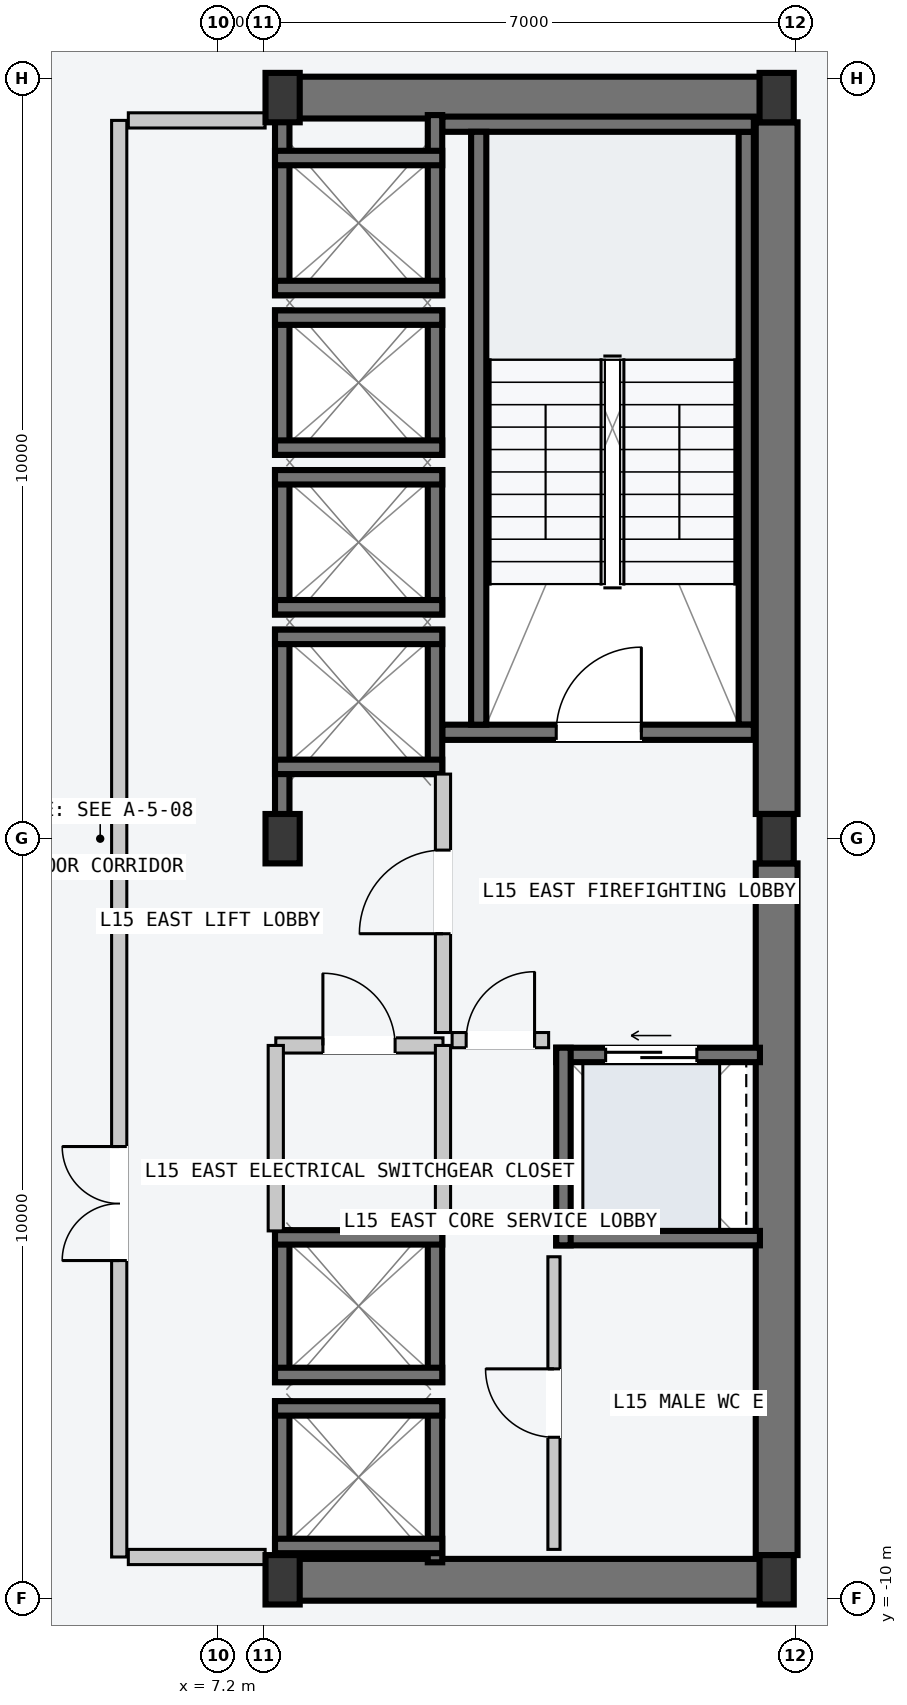
"""IFC4 building model, lengths in metres.
Left out: names, types, materials, properties, quantities, classifications, styles, units other than length and angle.
Written with IfcOpenShell. Run it as: python <this file> out.ifc"""

import sys

from ifc_helpers import new_model, si_unit, direction, frame, frame_2d, origin, origin_2d, place, context, subcontext, project, spatial, rectangle, i_section, extrude, element, fill, save


model = new_model("IFC4")
c1 = context("Model", 3, precision=1e-05, world=origin(), true_north=direction((0.0, 1.0)))
c2 = subcontext(c1, "Body", "Model", "MODEL_VIEW")
j1 = project(units=[si_unit("LENGTHUNIT", "METRE"), si_unit("PLANEANGLEUNIT", "RADIAN")], contexts=[c1])
p1 = place(None, origin())
s1 = spatial("IfcSite", under=j1, at=p1, CompositionType="ELEMENT")
p2 = place(p1, origin())
s2 = spatial("IfcBuilding", under=s1, at=p2, CompositionType="ELEMENT")
p3 = place(p2, frame((0.0, 0.0, 60.0)))
s3 = spatial("IfcBuildingStorey", under=s2, at=p3, CompositionType="ELEMENT", Elevation=60.0)
for number, where, z_axis, x_axis in (
    (1, (8.07, -9.75, -0.2), (0.0, 0.0, 1.0), (1.0, 0.0, 0.0)),
    (2, (8.07, 9.75, -0.2), (0.0, 0.0, 1.0), (1.0, 0.0, 0.0)),
):
    element("IfcWall", number, at=place(p3, frame(where, z_axis=z_axis, x_axis=x_axis)), inside=s3, PredefinedType="SHEAR", context=c2, shape_type="SweptSolid", body=[
        extrude(rectangle(XDim=6.46, YDim=0.55, at=frame_2d((3.23, 0.0))), origin(), (0.0, 0.0, 1.0), 3.6),
    ])
for number, where, z_axis, x_axis in (
    (3, (14.55, -9.425, -0.2), (0.0, 0.0, 1.0), (0.0, 1.0, 0.0)),
    (4, (14.55, 0.325, -0.2), (0.0, 0.0, 1.0), (0.0, 1.0, 0.0)),
):
    element("IfcWall", number, at=place(p3, frame(where, z_axis=z_axis, x_axis=x_axis)), inside=s3, PredefinedType="SHEAR", context=c2, shape_type="SweptSolid", body=[
        extrude(rectangle(XDim=9.1, YDim=0.55, at=frame_2d((4.55, 0.0))), origin(), (0.0, 0.0, 1.0), 3.6),
    ])
p4 = place(p3, frame((14.15, 1.5, -0.2), z_axis=(0.0, 0.0, 1.0), x_axis=(0.0, 1.0, 0.0)))
e5 = element("IfcWall", 5, at=p4, inside=s3, PredefinedType="SOLIDWALL", context=c2, shape_type="SweptSolid", body=[
    extrude(rectangle(XDim=7.8, YDim=0.2, at=frame_2d((3.9, 0.0))), origin(), (0.0, 0.0, 1.0), 3.6),
])
p5 = place(p3, frame((10.15, 1.4, -0.2), z_axis=(0.0, 0.0, 1.0), x_axis=(1.0, 0.0, 0.0)))
e6 = element("IfcWall", 6, at=p5, inside=s3, PredefinedType="SOLIDWALL", context=c2, shape_type="SweptSolid", body=[
    extrude(rectangle(XDim=4.1, YDim=0.2, at=frame_2d((2.05, 0.0))), origin(), (0.0, 0.0, 1.0), 3.6),
])
p6 = place(p5, frame((1.5, 0.0, 0.2)))
e7 = element("IfcOpeningElement", 7, at=p6, cuts=e6, PredefinedType="OPENING", context=c2, shape_type="SweptSolid", body=[
    extrude(rectangle(XDim=1.12, YDim=2.18, at=frame_2d((0.56, 1.09))), frame((0.0, 0.11, 0.0), z_axis=(0.0, -1.0, 0.0), x_axis=(1.0, 0.0, 0.0)), (0.0, 0.0, 1.0), 0.22),
])
p7 = place(p3, frame((10.15, 9.4, -0.2), z_axis=(0.0, 0.0, 1.0), x_axis=(1.0, 0.0, 0.0)))
e8 = element("IfcWall", 8, at=p7, inside=s3, PredefinedType="SOLIDWALL", context=c2, shape_type="SweptSolid", body=[
    extrude(rectangle(XDim=4.1, YDim=0.2, at=frame_2d((2.05, 0.0))), origin(), (0.0, 0.0, 1.0), 3.6),
])
p8 = place(p3, frame((10.63, 1.5, -0.2), z_axis=(0.0, 0.0, 1.0), x_axis=(0.0, 1.0, 0.0)))
e9 = element("IfcWall", 9, at=p8, inside=s3, PredefinedType="SOLIDWALL", context=c2, shape_type="SweptSolid", body=[
    extrude(rectangle(XDim=7.8, YDim=0.2, at=frame_2d((3.9, 0.0))), origin(), (0.0, 0.0, 1.0), 3.6),
])
for number, where, z_axis, x_axis in (
    (10, (8.05, -9.75, 0.0), (0.0, 0.0, 1.0), (1.0, 0.0, 0.0)),
    (11, (8.05, 0.0, 0.0), (0.0, 0.0, 1.0), (1.0, 0.0, 0.0)),
    (12, (8.05, 9.75, 0.0), (0.0, 0.0, 1.0), (1.0, 0.0, 0.0)),
    (13, (14.55, -9.75, 0.0), (0.0, 0.0, 1.0), (1.0, 0.0, 0.0)),
    (14, (14.55, 0.0, 0.0), (0.0, 0.0, 1.0), (1.0, 0.0, 0.0)),
    (15, (14.55, 9.75, 0.0), (0.0, 0.0, 1.0), (1.0, 0.0, 0.0)),
):
    element("IfcColumn", number, at=place(p3, frame(where, z_axis=z_axis, x_axis=x_axis)), inside=s3, PredefinedType="COLUMN", context=c2, shape_type="SweptSolid", body=[
        extrude(i_section(OverallWidth=0.45, OverallDepth=0.65, WebThickness=0.025, FlangeThickness=0.04, at=origin_2d()), origin(), (0.0, 0.0, 1.0), 3.6),
    ])
p9 = place(p3, frame((8.045, 0.21, -0.2), z_axis=(0.0, 0.0, 1.0), x_axis=(0.0, 1.0, 0.0)))
e16 = element("IfcWall", 16, at=p9, inside=s3, PredefinedType="SOLIDWALL", context=c2, shape_type="SweptSolid", body=[
    extrude(rectangle(XDim=2.54, YDim=0.19, at=frame_2d((1.27, 0.0))), origin(), (0.0, 0.0, 1.0), 3.6),
])
p10 = place(p3, frame((10.055, 0.85, -0.2), z_axis=(0.0, 0.0, 1.0), x_axis=(0.0, 1.0, 0.0)))
e17 = element("IfcWall", 17, at=p10, inside=s3, PredefinedType="SOLIDWALL", context=c2, shape_type="SweptSolid", body=[
    extrude(rectangle(XDim=1.9, YDim=0.19, at=frame_2d((0.95, 0.0))), origin(), (0.0, 0.0, 1.0), 3.6),
])
for number, where, z_axis, x_axis in (
    (18, (7.95, 2.655, -0.2), (0.0, 0.0, 1.0), (1.0, 0.0, 0.0)),
    (19, (7.95, 0.945, -0.2), (0.0, 0.0, 1.0), (1.0, 0.0, 0.0)),
):
    element("IfcWall", number, at=place(p3, frame(where, z_axis=z_axis, x_axis=x_axis)), inside=s3, PredefinedType="SOLIDWALL", context=c2, shape_type="SweptSolid", body=[
        extrude(rectangle(XDim=2.2, YDim=0.19, at=frame_2d((1.1, 0.0))), origin(), (0.0, 0.0, 1.0), 3.6),
    ])
for number, where, z_axis, x_axis in (
    (20, (8.045, 2.95, -0.2), (0.0, 0.0, 1.0), (0.0, 1.0, 0.0)),
    (21, (10.055, 2.95, -0.2), (0.0, 0.0, 1.0), (0.0, 1.0, 0.0)),
):
    element("IfcWall", number, at=place(p3, frame(where, z_axis=z_axis, x_axis=x_axis)), inside=s3, PredefinedType="SOLIDWALL", context=c2, shape_type="SweptSolid", body=[
        extrude(rectangle(XDim=1.9, YDim=0.19, at=frame_2d((0.95, 0.0))), origin(), (0.0, 0.0, 1.0), 3.6),
    ])
for number, where, z_axis, x_axis in (
    (22, (7.95, 4.755, -0.2), (0.0, 0.0, 1.0), (1.0, 0.0, 0.0)),
    (23, (7.95, 3.045, -0.2), (0.0, 0.0, 1.0), (1.0, 0.0, 0.0)),
):
    element("IfcWall", number, at=place(p3, frame(where, z_axis=z_axis, x_axis=x_axis)), inside=s3, PredefinedType="SOLIDWALL", context=c2, shape_type="SweptSolid", body=[
        extrude(rectangle(XDim=2.2, YDim=0.19, at=frame_2d((1.1, 0.0))), origin(), (0.0, 0.0, 1.0), 3.6),
    ])
for number, where, z_axis, x_axis in (
    (24, (8.045, 5.05, -0.2), (0.0, 0.0, 1.0), (0.0, 1.0, 0.0)),
    (25, (10.055, 5.05, -0.2), (0.0, 0.0, 1.0), (0.0, 1.0, 0.0)),
):
    element("IfcWall", number, at=place(p3, frame(where, z_axis=z_axis, x_axis=x_axis)), inside=s3, PredefinedType="SOLIDWALL", context=c2, shape_type="SweptSolid", body=[
        extrude(rectangle(XDim=1.9, YDim=0.19, at=frame_2d((0.95, 0.0))), origin(), (0.0, 0.0, 1.0), 3.6),
    ])
for number, where, z_axis, x_axis in (
    (26, (7.95, 6.855, -0.2), (0.0, 0.0, 1.0), (1.0, 0.0, 0.0)),
    (27, (7.95, 5.145, -0.2), (0.0, 0.0, 1.0), (1.0, 0.0, 0.0)),
):
    element("IfcWall", number, at=place(p3, frame(where, z_axis=z_axis, x_axis=x_axis)), inside=s3, PredefinedType="SOLIDWALL", context=c2, shape_type="SweptSolid", body=[
        extrude(rectangle(XDim=2.2, YDim=0.19, at=frame_2d((1.1, 0.0))), origin(), (0.0, 0.0, 1.0), 3.6),
    ])
for number, where, z_axis, x_axis in (
    (28, (8.045, 7.15, -0.2), (0.0, 0.0, 1.0), (0.0, 1.0, 0.0)),
    (29, (10.055, 7.15, -0.2), (0.0, 0.0, 1.0), (0.0, 1.0, 0.0)),
):
    element("IfcWall", number, at=place(p3, frame(where, z_axis=z_axis, x_axis=x_axis)), inside=s3, PredefinedType="SOLIDWALL", context=c2, shape_type="SweptSolid", body=[
        extrude(rectangle(XDim=2.37, YDim=0.19, at=frame_2d((1.185, 0.0))), origin(), (0.0, 0.0, 1.0), 3.6),
    ])
for number, where, z_axis, x_axis in (
    (30, (7.95, 8.955, -0.2), (0.0, 0.0, 1.0), (1.0, 0.0, 0.0)),
    (31, (7.95, 7.245, -0.2), (0.0, 0.0, 1.0), (1.0, 0.0, 0.0)),
):
    element("IfcWall", number, at=place(p3, frame(where, z_axis=z_axis, x_axis=x_axis)), inside=s3, PredefinedType="SOLIDWALL", context=c2, shape_type="SweptSolid", body=[
        extrude(rectangle(XDim=2.2, YDim=0.19, at=frame_2d((1.1, 0.0))), origin(), (0.0, 0.0, 1.0), 3.6),
    ])
for number, where, z_axis, x_axis in (
    (32, (8.045, -9.52, -0.2), (0.0, 0.0, 1.0), (0.0, 1.0, 0.0)),
    (33, (10.055, -9.52, -0.2), (0.0, 0.0, 1.0), (0.0, 1.0, 0.0)),
):
    element("IfcWall", number, at=place(p3, frame(where, z_axis=z_axis, x_axis=x_axis)), inside=s3, PredefinedType="SOLIDWALL", context=c2, shape_type="SweptSolid", body=[
        extrude(rectangle(XDim=2.12, YDim=0.19, at=frame_2d((1.06, 0.0))), origin(), (0.0, 0.0, 1.0), 3.6),
    ])
for number, where, z_axis, x_axis in (
    (34, (7.95, -7.495, -0.2), (0.0, 0.0, 1.0), (1.0, 0.0, 0.0)),
    (35, (7.95, -9.305, -0.2), (0.0, 0.0, 1.0), (1.0, 0.0, 0.0)),
):
    element("IfcWall", number, at=place(p3, frame(where, z_axis=z_axis, x_axis=x_axis)), inside=s3, PredefinedType="SOLIDWALL", context=c2, shape_type="SweptSolid", body=[
        extrude(rectangle(XDim=2.2, YDim=0.19, at=frame_2d((1.1, 0.0))), origin(), (0.0, 0.0, 1.0), 3.6),
    ])
for number, where, z_axis, x_axis in (
    (36, (8.045, -7.15, -0.2), (0.0, 0.0, 1.0), (0.0, 1.0, 0.0)),
    (37, (10.055, -7.15, -0.2), (0.0, 0.0, 1.0), (0.0, 1.0, 0.0)),
):
    element("IfcWall", number, at=place(p3, frame(where, z_axis=z_axis, x_axis=x_axis)), inside=s3, PredefinedType="SOLIDWALL", context=c2, shape_type="SweptSolid", body=[
        extrude(rectangle(XDim=2.0, YDim=0.19, at=frame_2d((1.0, 0.0))), origin(), (0.0, 0.0, 1.0), 3.6),
    ])
for number, where, z_axis, x_axis in (
    (38, (7.95, -5.245, -0.2), (0.0, 0.0, 1.0), (1.0, 0.0, 0.0)),
    (39, (7.95, -7.055, -0.2), (0.0, 0.0, 1.0), (1.0, 0.0, 0.0)),
):
    element("IfcWall", number, at=place(p3, frame(where, z_axis=z_axis, x_axis=x_axis)), inside=s3, PredefinedType="SOLIDWALL", context=c2, shape_type="SweptSolid", body=[
        extrude(rectangle(XDim=2.2, YDim=0.19, at=frame_2d((1.1, 0.0))), origin(), (0.0, 0.0, 1.0), 3.6),
    ])
p11 = place(p3, frame((11.65, -2.845, -0.2), z_axis=(0.0, 0.0, 1.0), x_axis=(1.0, 0.0, 0.0)))
e40 = element("IfcWall", 40, at=p11, inside=s3, PredefinedType="SOLIDWALL", context=c2, shape_type="SweptSolid", body=[
    extrude(rectangle(XDim=2.68, YDim=0.19, at=frame_2d((1.34, 0.0))), origin(), (0.0, 0.0, 1.0), 3.6),
])
p12 = place(p11, frame((0.65, 0.0, 0.2)))
e41 = element("IfcOpeningElement", 41, at=p12, cuts=e40, PredefinedType="OPENING", context=c2, shape_type="SweptSolid", body=[
    extrude(rectangle(XDim=1.2, YDim=2.2, at=frame_2d((0.6, 1.1))), frame((0.0, 0.105, 0.0), z_axis=(0.0, -1.0, 0.0), x_axis=(1.0, 0.0, 0.0)), (0.0, 0.0, 1.0), 0.21),
])
p13 = place(p3, frame((11.65, -5.255, -0.2), z_axis=(0.0, 0.0, 1.0), x_axis=(1.0, 0.0, 0.0)))
e42 = element("IfcWall", 42, at=p13, inside=s3, PredefinedType="SOLIDWALL", context=c2, shape_type="SweptSolid", body=[
    extrude(rectangle(XDim=2.68, YDim=0.19, at=frame_2d((1.34, 0.0))), origin(), (0.0, 0.0, 1.0), 3.6),
])
p14 = place(p3, frame((11.745, -5.35, -0.2), z_axis=(0.0, 0.0, 1.0), x_axis=(0.0, 1.0, 0.0)))
e43 = element("IfcWall", 43, at=p14, inside=s3, PredefinedType="SOLIDWALL", context=c2, shape_type="SweptSolid", body=[
    extrude(rectangle(XDim=2.6, YDim=0.19, at=frame_2d((1.3, 0.0))), origin(), (0.0, 0.0, 1.0), 3.6),
])
p15 = place(p3, frame((5.9, -9.45, 0.0), z_axis=(0.0, 0.0, 1.0), x_axis=(0.0, 1.0, 0.0)))
e44 = element("IfcWall", 44, at=p15, inside=s3, PredefinedType="PARTITIONING", context=c2, shape_type="SweptSolid", body=[
    extrude(rectangle(XDim=18.9, YDim=0.2, at=frame_2d((9.45, 0.0))), origin(), (0.0, 0.0, 1.0), 3.4),
])
p16 = place(p15, frame((3.9, 0.0, 0.0)))
e45 = element("IfcOpeningElement", 45, at=p16, cuts=e44, PredefinedType="OPENING", context=c2, shape_type="SweptSolid", body=[
    extrude(rectangle(XDim=1.5, YDim=2.2, at=frame_2d((0.75, 1.1))), frame((0.0, 0.11, 0.0), z_axis=(0.0, -1.0, 0.0), x_axis=(1.0, 0.0, 0.0)), (0.0, 0.0, 1.0), 0.22),
])
for number, where, z_axis, x_axis in (
    (46, (6.02, -9.45, 0.0), (0.0, 0.0, 1.0), (1.0, 0.0, 0.0)),
    (47, (6.02, 9.45, 0.0), (0.0, 0.0, 1.0), (1.0, 0.0, 0.0)),
):
    element("IfcWall", number, at=place(p3, frame(where, z_axis=z_axis, x_axis=x_axis)), inside=s3, PredefinedType="PARTITIONING", context=c2, shape_type="SweptSolid", body=[
        extrude(rectangle(XDim=1.8, YDim=0.2, at=frame_2d((0.9, 0.0))), origin(), (0.0, 0.0, 1.0), 3.4),
    ])
p17 = place(p3, frame((10.16, -2.55, 0.0), z_axis=(0.0, 0.0, 1.0), x_axis=(0.0, 1.0, 0.0)))
e48 = element("IfcWall", 48, at=p17, inside=s3, PredefinedType="PARTITIONING", context=c2, shape_type="SweptSolid", body=[
    extrude(rectangle(XDim=3.4, YDim=0.2, at=frame_2d((1.7, 0.0))), origin(), (0.0, 0.0, 1.0), 3.4),
])
p18 = place(p17, frame((1.3, 0.0, 0.0)))
e49 = element("IfcOpeningElement", 49, at=p18, cuts=e48, PredefinedType="OPENING", context=c2, shape_type="SweptSolid", body=[
    extrude(rectangle(XDim=1.1, YDim=2.15, at=frame_2d((0.55, 1.075))), frame((0.0, 0.11, 0.0), z_axis=(0.0, -1.0, 0.0), x_axis=(1.0, 0.0, 0.0)), (0.0, 0.0, 1.0), 0.22),
])
p19 = place(p3, frame((10.28, -2.65, 0.0), z_axis=(0.0, 0.0, 1.0), x_axis=(1.0, 0.0, 0.0)))
e50 = element("IfcWall", 50, at=p19, inside=s3, PredefinedType="PARTITIONING", context=c2, shape_type="SweptSolid", body=[
    extrude(rectangle(XDim=1.27, YDim=0.2, at=frame_2d((0.635, 0.0))), origin(), (0.0, 0.0, 1.0), 3.4),
])
p20 = place(p19, frame((0.185, 0.0, 0.0)))
e51 = element("IfcOpeningElement", 51, at=p20, cuts=e50, PredefinedType="OPENING", context=c2, shape_type="SweptSolid", body=[
    extrude(rectangle(XDim=0.9, YDim=2.15, at=frame_2d((0.45, 1.075))), frame((0.0, 0.11, 0.0), z_axis=(0.0, -1.0, 0.0), x_axis=(1.0, 0.0, 0.0)), (0.0, 0.0, 1.0), 0.22),
])
p21 = place(p3, frame((7.96, -2.72, 0.0), z_axis=(0.0, 0.0, 1.0), x_axis=(1.0, 0.0, 0.0)))
e52 = element("IfcWall", 52, at=p21, inside=s3, PredefinedType="PARTITIONING", context=c2, shape_type="SweptSolid", body=[
    extrude(rectangle(XDim=2.2, YDim=0.2, at=frame_2d((1.1, 0.0))), origin(), (0.0, 0.0, 1.0), 3.4),
])
p22 = place(p21, frame((0.62, 0.0, 0.0)))
e53 = element("IfcOpeningElement", 53, at=p22, cuts=e52, PredefinedType="OPENING", context=c2, shape_type="SweptSolid", body=[
    extrude(rectangle(XDim=0.95, YDim=2.1, at=frame_2d((0.475, 1.05))), frame((0.0, 0.11, 0.0), z_axis=(0.0, -1.0, 0.0), x_axis=(1.0, 0.0, 0.0)), (0.0, 0.0, 1.0), 0.22),
])
for number, where, z_axis, x_axis in (
    (54, (7.96, -5.16, 0.0), (0.0, 0.0, 1.0), (0.0, 1.0, 0.0)),
    (55, (10.16, -5.16, 0.0), (0.0, 0.0, 1.0), (0.0, 1.0, 0.0)),
):
    element("IfcWall", number, at=place(p3, frame(where, z_axis=z_axis, x_axis=x_axis)), inside=s3, PredefinedType="PARTITIONING", context=c2, shape_type="SweptSolid", body=[
        extrude(rectangle(XDim=2.44, YDim=0.2, at=frame_2d((1.22, 0.0))), origin(), (0.0, 0.0, 1.0), 3.4),
    ])
p23 = place(p3, frame((11.62, -9.35, 0.0), z_axis=(0.0, 0.0, 1.0), x_axis=(0.0, 1.0, 0.0)))
e56 = element("IfcWall", 56, at=p23, inside=s3, PredefinedType="PARTITIONING", context=c2, shape_type="SweptSolid", body=[
    extrude(rectangle(XDim=3.85, YDim=0.16, at=frame_2d((1.925, 0.0))), origin(), (0.0, 0.0, 1.0), 3.4),
])
p24 = place(p23, frame((1.475, 0.0, 0.0)))
e57 = element("IfcOpeningElement", 57, at=p24, cuts=e56, PredefinedType="OPENING", context=c2, shape_type="SweptSolid", body=[
    extrude(rectangle(XDim=0.9, YDim=2.15, at=frame_2d((0.45, 1.075))), frame((0.0, 0.09, 0.0), z_axis=(0.0, -1.0, 0.0), x_axis=(1.0, 0.0, 0.0)), (0.0, 0.0, 1.0), 0.18),
])
p25 = place(p6, origin())
e58 = element("IfcDoor", 58, at=p25, inside=s3, OperationType="SINGLE_SWING_RIGHT", PredefinedType="DOOR", context=c2, shape_type="SweptSolid", body=[
    extrude(rectangle(XDim=1.12, YDim=2.18, at=frame_2d((0.56, 1.09))), frame((0.0, 0.025, 0.0), z_axis=(0.0, -1.0, 0.0), x_axis=(1.0, 0.0, 0.0)), (0.0, 0.0, 1.0), 0.05),
])
fill(e7, e58)
p26 = place(p12, origin())
e59 = element("IfcDoor", 59, at=p26, inside=s3, OperationType="SLIDING_TO_LEFT", PredefinedType="DOOR", context=c2, shape_type="SweptSolid", body=[
    extrude(rectangle(XDim=1.2, YDim=2.2, at=frame_2d((0.6, 1.1))), frame((0.0, 0.025, 0.0), z_axis=(0.0, -1.0, 0.0), x_axis=(1.0, 0.0, 0.0)), (0.0, 0.0, 1.0), 0.05),
])
fill(e41, e59)
p27 = place(p16, origin())
e60 = element("IfcDoor", 60, at=p27, inside=s3, OperationType="DOUBLE_DOOR_SINGLE_SWING", PredefinedType="DOOR", context=c2, shape_type="SweptSolid", body=[
    extrude(rectangle(XDim=1.5, YDim=2.2, at=frame_2d((0.75, 1.1))), frame((0.0, 0.025, 0.0), z_axis=(0.0, -1.0, 0.0), x_axis=(1.0, 0.0, 0.0)), (0.0, 0.0, 1.0), 0.05),
])
fill(e45, e60)
p28 = place(p18, origin())
e61 = element("IfcDoor", 61, at=p28, inside=s3, OperationType="SINGLE_SWING_LEFT", PredefinedType="DOOR", context=c2, shape_type="SweptSolid", body=[
    extrude(rectangle(XDim=1.1, YDim=2.15, at=frame_2d((0.55, 1.075))), frame((0.0, 0.025, 0.0), z_axis=(0.0, -1.0, 0.0), x_axis=(1.0, 0.0, 0.0)), (0.0, 0.0, 1.0), 0.05),
])
fill(e49, e61)
p29 = place(p20, origin())
e62 = element("IfcDoor", 62, at=p29, inside=s3, OperationType="SINGLE_SWING_RIGHT", PredefinedType="DOOR", context=c2, shape_type="SweptSolid", body=[
    extrude(rectangle(XDim=0.9, YDim=2.15, at=frame_2d((0.45, 1.075))), frame((0.0, 0.025, 0.0), z_axis=(0.0, -1.0, 0.0), x_axis=(1.0, 0.0, 0.0)), (0.0, 0.0, 1.0), 0.05),
])
fill(e51, e62)
p30 = place(p22, origin())
e63 = element("IfcDoor", 63, at=p30, inside=s3, OperationType="SINGLE_SWING_LEFT", PredefinedType="DOOR", context=c2, shape_type="SweptSolid", body=[
    extrude(rectangle(XDim=0.95, YDim=2.1, at=frame_2d((0.475, 1.05))), frame((0.0, 0.025, 0.0), z_axis=(0.0, -1.0, 0.0), x_axis=(1.0, 0.0, 0.0)), (0.0, 0.0, 1.0), 0.05),
])
fill(e53, e63)
p31 = place(p24, origin())
e64 = element("IfcDoor", 64, at=p31, inside=s3, OperationType="SINGLE_SWING_RIGHT", PredefinedType="DOOR", context=c2, shape_type="SweptSolid", body=[
    extrude(rectangle(XDim=0.9, YDim=2.15, at=frame_2d((0.45, 1.075))), frame((0.0, 0.025, 0.0), z_axis=(0.0, -1.0, 0.0), x_axis=(1.0, 0.0, 0.0)), (0.0, 0.0, 1.0), 0.05),
])
fill(e57, e64)
save(model, sys.argv[1])
